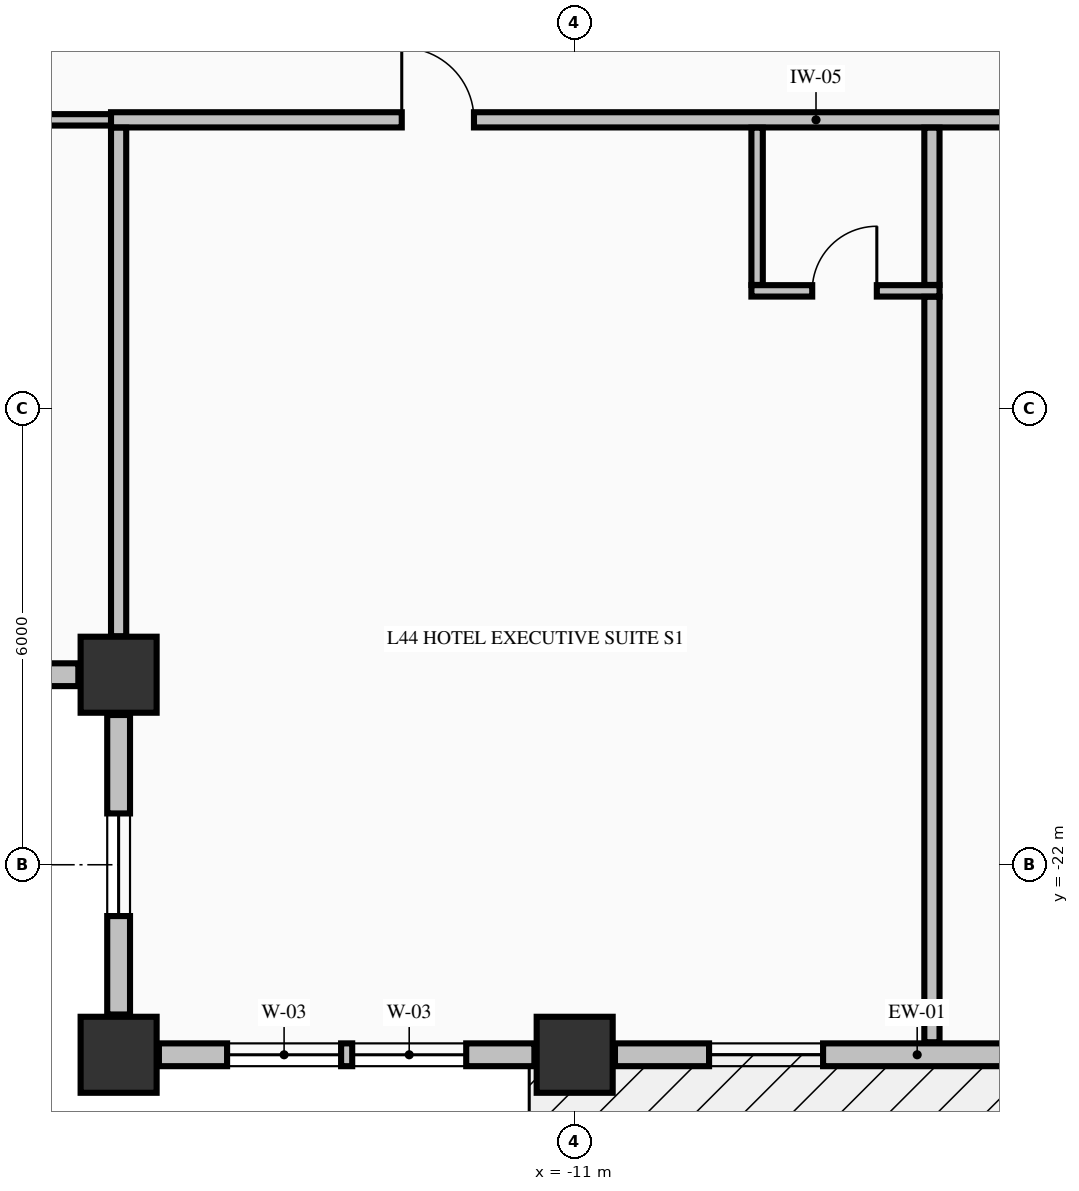
"""IFC4 building model, lengths in metres.
Left out: names, types, materials, properties, quantities, classifications, styles, units other than length and angle.
Written with IfcOpenShell. Run it as: python <this file> out.ifc"""

import sys

from ifc_helpers import new_model, si_unit, direction, frame, frame_2d, origin, origin_2d, place, context, subcontext, project, spatial, rectangle, extrude, element, fill, save


model = new_model("IFC4")
c1 = context("Model", 3, precision=1e-05, world=origin(), true_north=direction((0.0, 1.0)))
c2 = subcontext(c1, "Body", "Model", "MODEL_VIEW")
j1 = project(units=[si_unit("LENGTHUNIT", "METRE"), si_unit("PLANEANGLEUNIT", "RADIAN")], contexts=[c1])
p1 = place(None, origin())
s1 = spatial("IfcSite", under=j1, at=p1, CompositionType="ELEMENT")
p2 = place(p1, origin())
s2 = spatial("IfcBuilding", under=s1, at=p2, CompositionType="ELEMENT")
p3 = place(p2, frame((0.0, 0.0, 172.86)))
s3 = spatial("IfcBuildingStorey", under=s2, at=p3, CompositionType="ELEMENT", Elevation=172.86)
for number, where, z_axis, x_axis in (
    (1, (-17.0, -24.5, -0.25), (0.0, 0.0, 1.0), (1.0, 0.0, 0.0)),
    (2, (-11.0, -24.5, -0.25), (0.0, 0.0, 1.0), (1.0, 0.0, 0.0)),
    (3, (-17.0, -19.5, -0.25), (0.0, 0.0, 1.0), (1.0, 0.0, 0.0)),
):
    element("IfcColumn", number, at=place(p3, frame(where, z_axis=z_axis, x_axis=x_axis)), inside=s3, PredefinedType="COLUMN", context=c2, shape_type="SweptSolid", body=[
        extrude(rectangle(XDim=1.0, YDim=1.0, at=origin_2d()), origin(), (0.0, 0.0, 1.0), 3.375),
    ])
p4 = place(p3, frame((-21.47, -19.5, 0.0), z_axis=(0.0, 0.0, 1.0), x_axis=(1.0, 0.0, 0.0)))
e4 = element("IfcWall", 4, at=p4, inside=s3, PredefinedType="STANDARD", context=c2, shape_type="SweptSolid", body=[
    extrude(rectangle(XDim=3.94, YDim=0.3, at=frame_2d((1.97, 0.0))), origin(), (0.0, 0.0, 1.0), 2.517),
])
p5 = place(p4, frame((1.295, 0.0, 0.68)))
e5 = element("IfcOpeningElement", 5, at=p5, cuts=e4, PredefinedType="OPENING", context=c2, shape_type="SweptSolid", body=[
    extrude(rectangle(XDim=1.35, YDim=1.42, at=frame_2d((0.675, 0.71))), frame((0.0, 0.16, 0.0), z_axis=(0.0, -1.0, 0.0), x_axis=(1.0, 0.0, 0.0)), (0.0, 0.0, 1.0), 0.32),
])
p6 = place(p3, frame((-17.0, -20.03, 0.0), z_axis=(0.0, 0.0, 1.0), x_axis=(0.0, -1.0, 0.0)))
e6 = element("IfcWall", 6, at=p6, inside=s3, PredefinedType="STANDARD", context=c2, shape_type="SweptSolid", body=[
    extrude(rectangle(XDim=3.94, YDim=0.3, at=frame_2d((1.97, 0.0))), origin(), (0.0, 0.0, 1.0), 2.517),
])
p7 = place(p6, frame((1.295, 0.0, 0.68)))
e7 = element("IfcOpeningElement", 7, at=p7, cuts=e6, PredefinedType="OPENING", context=c2, shape_type="SweptSolid", body=[
    extrude(rectangle(XDim=1.35, YDim=1.42, at=frame_2d((0.675, 0.71))), frame((0.0, 0.16, 0.0), z_axis=(0.0, -1.0, 0.0), x_axis=(1.0, 0.0, 0.0)), (0.0, 0.0, 1.0), 0.32),
])
p8 = place(p3, frame((-16.47, -24.5, 0.0), z_axis=(0.0, 0.0, 1.0), x_axis=(1.0, 0.0, 0.0)))
e8 = element("IfcWall", 8, at=p8, inside=s3, PredefinedType="STANDARD", context=c2, shape_type="SweptSolid", body=[
    extrude(rectangle(XDim=4.94, YDim=0.3, at=frame_2d((2.47, 0.0))), origin(), (0.0, 0.0, 1.0), 2.517),
])
p9 = place(p8, frame((0.897, 0.0, 0.72)))
e9 = element("IfcOpeningElement", 9, at=p9, cuts=e8, PredefinedType="OPENING", context=c2, shape_type="SweptSolid", body=[
    extrude(rectangle(XDim=1.5, YDim=1.6, at=frame_2d((0.75, 0.8))), frame((0.0, 0.16, 0.0), z_axis=(0.0, -1.0, 0.0), x_axis=(1.0, 0.0, 0.0)), (0.0, 0.0, 1.0), 0.32),
])
p10 = place(p8, frame((2.543, 0.0, 0.72)))
e10 = element("IfcOpeningElement", 10, at=p10, cuts=e8, PredefinedType="OPENING", context=c2, shape_type="SweptSolid", body=[
    extrude(rectangle(XDim=1.5, YDim=1.6, at=frame_2d((0.75, 0.8))), frame((0.0, 0.16, 0.0), z_axis=(0.0, -1.0, 0.0), x_axis=(1.0, 0.0, 0.0)), (0.0, 0.0, 1.0), 0.32),
])
p11 = place(p3, frame((-10.47, -24.5, 0.0), z_axis=(0.0, 0.0, 1.0), x_axis=(1.0, 0.0, 0.0)))
e11 = element("IfcWall", 11, at=p11, inside=s3, PredefinedType="STANDARD", context=c2, shape_type="SweptSolid", body=[
    extrude(rectangle(XDim=9.94, YDim=0.3, at=frame_2d((4.97, 0.0))), origin(), (0.0, 0.0, 1.0), 2.517),
])
p12 = place(p11, frame((8.288, 0.0, 0.0)))
e12 = element("IfcOpeningElement", 12, at=p12, cuts=e11, PredefinedType="OPENING", context=c2, shape_type="SweptSolid", body=[
    extrude(rectangle(XDim=1.1, YDim=2.15, at=frame_2d((0.55, 1.075))), frame((0.0, 0.16, 0.0), z_axis=(0.0, -1.0, 0.0), x_axis=(1.0, 0.0, 0.0)), (0.0, 0.0, 1.0), 0.32),
])
p13 = place(p11, frame((1.238, 0.0, 0.72)))
e13 = element("IfcOpeningElement", 13, at=p13, cuts=e11, PredefinedType="OPENING", context=c2, shape_type="SweptSolid", body=[
    extrude(rectangle(XDim=1.5, YDim=1.6, at=frame_2d((0.75, 0.8))), frame((0.0, 0.16, 0.0), z_axis=(0.0, -1.0, 0.0), x_axis=(1.0, 0.0, 0.0)), (0.0, 0.0, 1.0), 0.32),
])
p14 = place(p11, frame((5.214, 0.0, 0.72)))
e14 = element("IfcOpeningElement", 14, at=p14, cuts=e11, PredefinedType="OPENING", context=c2, shape_type="SweptSolid", body=[
    extrude(rectangle(XDim=1.5, YDim=1.6, at=frame_2d((0.75, 0.8))), frame((0.0, 0.16, 0.0), z_axis=(0.0, -1.0, 0.0), x_axis=(1.0, 0.0, 0.0)), (0.0, 0.0, 1.0), 0.32),
])
p15 = place(p3, frame((-8.675, -14.45, 0.0), z_axis=(0.0, 0.0, 1.0), x_axis=(1.0, 0.0, 0.0)))
e15 = element("IfcWall", 15, at=p15, inside=s3, PredefinedType="PARTITIONING", context=c2, shape_type="SweptSolid", body=[
    extrude(rectangle(XDim=2.475, YDim=0.15, at=frame_2d((1.238, 0.0))), origin(), (0.0, 0.0, 1.0), 2.665),
])
p16 = place(p15, frame((0.8, 0.0, 0.0)))
e16 = element("IfcOpeningElement", 16, at=p16, cuts=e15, PredefinedType="OPENING", context=c2, shape_type="SweptSolid", body=[
    extrude(rectangle(XDim=0.85, YDim=2.1, at=frame_2d((0.425, 1.05))), frame((0.0, 0.085, 0.0), z_axis=(0.0, -1.0, 0.0), x_axis=(1.0, 0.0, 0.0)), (0.0, 0.0, 1.0), 0.17),
])
p17 = place(p3, frame((-20.075, -12.2, 0.0), z_axis=(0.0, 0.0, 1.0), x_axis=(1.0, 0.0, 0.0)))
e17 = element("IfcWall", 17, at=p17, inside=s3, PredefinedType="PARTITIONING", context=c2, shape_type="SweptSolid", body=[
    extrude(rectangle(XDim=3.175, YDim=0.15, at=frame_2d((1.587, 0.0))), origin(), (0.0, 0.0, 1.0), 3.125),
])
p18 = place(p3, frame((-17.1, -12.2, 0.0), z_axis=(0.0, 0.0, 1.0), x_axis=(1.0, 0.0, 0.0)))
e18 = element("IfcWall", 18, at=p18, inside=s3, PredefinedType="PARTITIONING", context=c2, shape_type="SweptSolid", body=[
    extrude(rectangle(XDim=39.2, YDim=0.2, at=frame_2d((19.6, 0.0))), origin(), (0.0, 0.0, 1.0), 3.125),
])
p19 = place(p18, frame((3.825, 0.0, 0.0)))
e19 = element("IfcOpeningElement", 19, at=p19, cuts=e18, PredefinedType="OPENING", context=c2, shape_type="SweptSolid", body=[
    extrude(rectangle(XDim=0.95, YDim=2.15, at=frame_2d((0.475, 1.075))), frame((0.0, 0.11, 0.0), z_axis=(0.0, -1.0, 0.0), x_axis=(1.0, 0.0, 0.0)), (0.0, 0.0, 1.0), 0.22),
])
p20 = place(p18, frame((13.775, 0.0, 0.0)))
e20 = element("IfcOpeningElement", 20, at=p20, cuts=e18, PredefinedType="OPENING", context=c2, shape_type="SweptSolid", body=[
    extrude(rectangle(XDim=0.95, YDim=2.15, at=frame_2d((0.475, 1.075))), frame((0.0, 0.11, 0.0), z_axis=(0.0, -1.0, 0.0), x_axis=(1.0, 0.0, 0.0)), (0.0, 0.0, 1.0), 0.22),
])
p21 = place(p18, frame((21.775, 0.0, 0.0)))
e21 = element("IfcOpeningElement", 21, at=p21, cuts=e18, PredefinedType="OPENING", context=c2, shape_type="SweptSolid", body=[
    extrude(rectangle(XDim=0.95, YDim=2.15, at=frame_2d((0.475, 1.075))), frame((0.0, 0.11, 0.0), z_axis=(0.0, -1.0, 0.0), x_axis=(1.0, 0.0, 0.0)), (0.0, 0.0, 1.0), 0.22),
])
p22 = place(p18, frame((27.975, 0.0, 0.0)))
e22 = element("IfcOpeningElement", 22, at=p22, cuts=e18, PredefinedType="OPENING", context=c2, shape_type="SweptSolid", body=[
    extrude(rectangle(XDim=0.95, YDim=2.15, at=frame_2d((0.475, 1.075))), frame((0.0, 0.11, 0.0), z_axis=(0.0, -1.0, 0.0), x_axis=(1.0, 0.0, 0.0)), (0.0, 0.0, 1.0), 0.22),
])
p23 = place(p18, frame((34.325, 0.0, 0.0)))
e23 = element("IfcOpeningElement", 23, at=p23, cuts=e18, PredefinedType="OPENING", context=c2, shape_type="SweptSolid", body=[
    extrude(rectangle(XDim=0.95, YDim=2.15, at=frame_2d((0.475, 1.075))), frame((0.0, 0.11, 0.0), z_axis=(0.0, -1.0, 0.0), x_axis=(1.0, 0.0, 0.0)), (0.0, 0.0, 1.0), 0.22),
])
p24 = place(p3, frame((-17.0, -18.994, 0.0), z_axis=(0.0, 0.0, 1.0), x_axis=(0.0, 1.0, 0.0)))
e24 = element("IfcWall", 24, at=p24, inside=s3, PredefinedType="PARTITIONING", context=c2, shape_type="SweptSolid", body=[
    extrude(rectangle(XDim=6.691, YDim=0.2, at=frame_2d((3.345, 0.0))), origin(), (0.0, 0.0, 1.0), 3.125),
])
p25 = place(p3, frame((-8.6, -14.372, 0.0), z_axis=(0.0, 0.0, 1.0), x_axis=(0.0, 1.0, 0.0)))
e25 = element("IfcWall", 25, at=p25, inside=s3, PredefinedType="PARTITIONING", context=c2, shape_type="SweptSolid", body=[
    extrude(rectangle(XDim=2.069, YDim=0.15, at=frame_2d((1.035, 0.0))), origin(), (0.0, 0.0, 1.0), 3.125),
])
p26 = place(p3, frame((-6.3, -24.335, 0.0), z_axis=(0.0, 0.0, 1.0), x_axis=(0.0, 1.0, 0.0)))
e26 = element("IfcWall", 26, at=p26, inside=s3, PredefinedType="PARTITIONING", context=c2, shape_type="SweptSolid", body=[
    extrude(rectangle(XDim=9.807, YDim=0.2, at=frame_2d((4.903, 0.0))), origin(), (0.0, 0.0, 1.0), 3.125),
])
p27 = place(p3, frame((-6.3, -14.372, 0.0), z_axis=(0.0, 0.0, 1.0), x_axis=(0.0, 1.0, 0.0)))
e27 = element("IfcWall", 27, at=p27, inside=s3, PredefinedType="PARTITIONING", context=c2, shape_type="SweptSolid", body=[
    extrude(rectangle(XDim=2.069, YDim=0.2, at=frame_2d((1.035, 0.0))), origin(), (0.0, 0.0, 1.0), 3.125),
])
p28 = place(p7, origin())
e28 = element("IfcWindow", 28, at=p28, inside=s3, PartitioningType="SINGLE_PANEL", PredefinedType="WINDOW", context=c2, shape_type="SweptSolid", body=[
    extrude(rectangle(XDim=1.35, YDim=1.42, at=frame_2d((0.675, 0.71))), frame((0.0, 0.03, 0.0), z_axis=(0.0, -1.0, 0.0), x_axis=(1.0, 0.0, 0.0)), (0.0, 0.0, 1.0), 0.06),
])
fill(e7, e28)
p29 = place(p9, origin())
e29 = element("IfcWindow", 29, at=p29, inside=s3, PartitioningType="SINGLE_PANEL", PredefinedType="WINDOW", context=c2, shape_type="SweptSolid", body=[
    extrude(rectangle(XDim=1.5, YDim=1.6, at=frame_2d((0.75, 0.8))), frame((0.0, 0.03, 0.0), z_axis=(0.0, -1.0, 0.0), x_axis=(1.0, 0.0, 0.0)), (0.0, 0.0, 1.0), 0.06),
])
fill(e9, e29)
p30 = place(p10, origin())
e30 = element("IfcWindow", 30, at=p30, inside=s3, PartitioningType="SINGLE_PANEL", PredefinedType="WINDOW", context=c2, shape_type="SweptSolid", body=[
    extrude(rectangle(XDim=1.5, YDim=1.6, at=frame_2d((0.75, 0.8))), frame((0.0, 0.03, 0.0), z_axis=(0.0, -1.0, 0.0), x_axis=(1.0, 0.0, 0.0)), (0.0, 0.0, 1.0), 0.06),
])
fill(e10, e30)
p31 = place(p13, origin())
e31 = element("IfcWindow", 31, at=p31, inside=s3, PartitioningType="SINGLE_PANEL", PredefinedType="WINDOW", context=c2, shape_type="SweptSolid", body=[
    extrude(rectangle(XDim=1.5, YDim=1.6, at=frame_2d((0.75, 0.8))), frame((0.0, 0.03, 0.0), z_axis=(0.0, -1.0, 0.0), x_axis=(1.0, 0.0, 0.0)), (0.0, 0.0, 1.0), 0.06),
])
fill(e13, e31)
p32 = place(p19, origin())
e32 = element("IfcDoor", 32, at=p32, inside=s3, OperationType="SINGLE_SWING_LEFT", PredefinedType="DOOR", context=c2, shape_type="SweptSolid", body=[
    extrude(rectangle(XDim=0.95, YDim=2.15, at=frame_2d((0.475, 1.075))), frame((0.0, 0.025, 0.0), z_axis=(0.0, -1.0, 0.0), x_axis=(1.0, 0.0, 0.0)), (0.0, 0.0, 1.0), 0.05),
])
fill(e19, e32)
p33 = place(p16, origin())
e33 = element("IfcDoor", 33, at=p33, inside=s3, OperationType="SINGLE_SWING_RIGHT", PredefinedType="DOOR", context=c2, shape_type="SweptSolid", body=[
    extrude(rectangle(XDim=0.85, YDim=2.1, at=frame_2d((0.425, 1.05))), frame((0.0, 0.025, 0.0), z_axis=(0.0, -1.0, 0.0), x_axis=(1.0, 0.0, 0.0)), (0.0, 0.0, 1.0), 0.05),
])
fill(e16, e33)
save(model, sys.argv[1])
